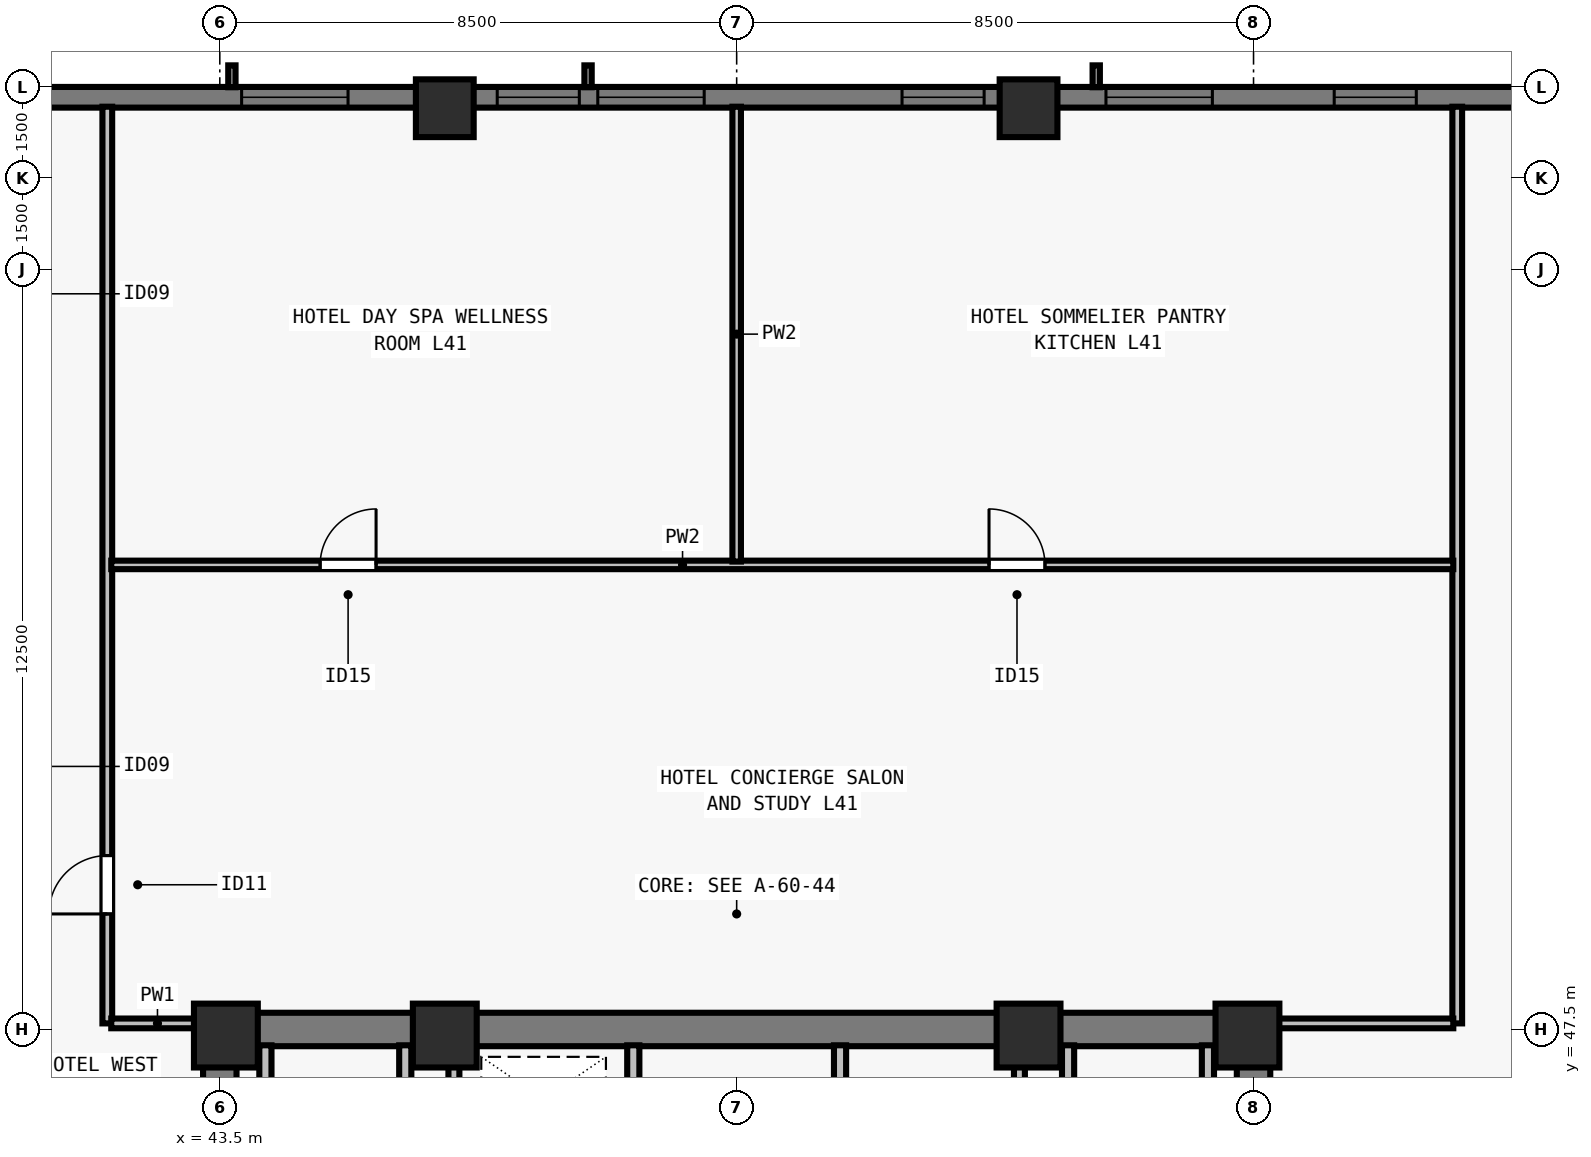
"""IFC4 building model, lengths in metres.
Left out: names, types, materials, properties, quantities, classifications, styles, units other than length and angle.
Written with IfcOpenShell. Run it as: python <this file> out.ifc"""

import sys

from ifc_helpers import new_model, si_unit, direction, frame, frame_2d, origin, origin_2d, place, context, subcontext, project, spatial, rectangle, extrude, element, fill, save


model = new_model("IFC4")
c1 = context("Model", 3, precision=1e-05, world=origin(), true_north=direction((0.0, 1.0)))
c2 = subcontext(c1, "Body", "Model", "MODEL_VIEW")
j1 = project(units=[si_unit("LENGTHUNIT", "METRE"), si_unit("PLANEANGLEUNIT", "RADIAN")], contexts=[c1])
p1 = place(None, origin())
s1 = spatial("IfcSite", under=j1, at=p1, CompositionType="ELEMENT")
p2 = place(p1, origin())
s2 = spatial("IfcBuilding", under=s1, at=p2, CompositionType="ELEMENT")
p3 = place(p2, frame((0.0, 0.0, 151.5)))
s3 = spatial("IfcBuildingStorey", under=s2, at=p3, CompositionType="ELEMENT", Elevation=151.5)
for number, where, z_axis, x_axis in (
    (1, (43.6, 47.4, 0.0), (0.0, 0.0, 1.0), (1.0, 0.0, 0.0)),
    (2, (47.2, 47.4, 0.0), (0.0, 0.0, 1.0), (1.0, 0.0, 0.0)),
    (3, (56.8, 47.4, 0.0), (0.0, 0.0, 1.0), (1.0, 0.0, 0.0)),
    (4, (60.4, 47.4, 0.0), (0.0, 0.0, 1.0), (1.0, 0.0, 0.0)),
):
    element("IfcColumn", number, at=place(p3, frame(where, z_axis=z_axis, x_axis=x_axis)), inside=s3, PredefinedType="COLUMN", context=c2, shape_type="SweptSolid", body=[
        extrude(rectangle(XDim=1.05, YDim=1.05, at=origin_2d()), origin(), (0.0, 0.0, 1.0), 3.5),
    ])
for number, where, z_axis, x_axis in (
    (5, (56.8, 62.65, 0.0), (0.0, 0.0, 1.0), (1.0, 0.0, 0.0)),
    (6, (47.2, 62.65, 0.0), (0.0, 0.0, 1.0), (1.0, 0.0, 0.0)),
):
    element("IfcColumn", number, at=place(p3, frame(where, z_axis=z_axis, x_axis=x_axis)), inside=s3, PredefinedType="COLUMN", context=c2, shape_type="SweptSolid", body=[
        extrude(rectangle(XDim=0.95, YDim=0.95, at=origin_2d()), origin(), (0.0, 0.0, 1.0), 3.5),
    ])
p4 = place(p3, frame((32.0, 62.83, 0.0), z_axis=(0.0, 0.0, 1.0), x_axis=(1.0, 0.0, 0.0)))
e7 = element("IfcWall", 7, at=p4, inside=s3, PredefinedType="SOLIDWALL", context=c2, shape_type="SweptSolid", body=[
    extrude(rectangle(XDim=39.682, YDim=0.34, at=frame_2d((19.841, 0.0))), origin(), (0.0, 0.0, 1.0), 3.28),
])
p5 = place(p4, frame((4.752, 0.0, 0.8)))
e8 = element("IfcOpeningElement", 8, at=p5, cuts=e7, PredefinedType="OPENING", context=c2, shape_type="SweptSolid", body=[
    extrude(rectangle(XDim=1.75, YDim=1.66, at=frame_2d((0.875, 0.83))), frame((0.0, 0.18, 0.0), z_axis=(0.0, -1.0, 0.0), x_axis=(1.0, 0.0, 0.0)), (0.0, 0.0, 1.0), 0.36),
])
p6 = place(p4, frame((11.859, 0.0, 0.8)))
e9 = element("IfcOpeningElement", 9, at=p6, cuts=e7, PredefinedType="OPENING", context=c2, shape_type="SweptSolid", body=[
    extrude(rectangle(XDim=1.75, YDim=1.66, at=frame_2d((0.875, 0.83))), frame((0.0, 0.18, 0.0), z_axis=(0.0, -1.0, 0.0), x_axis=(1.0, 0.0, 0.0)), (0.0, 0.0, 1.0), 0.36),
])
p7 = place(p4, frame((16.062, 0.0, 0.8)))
e10 = element("IfcOpeningElement", 10, at=p7, cuts=e7, PredefinedType="OPENING", context=c2, shape_type="SweptSolid", body=[
    extrude(rectangle(XDim=1.35, YDim=1.66, at=frame_2d((0.675, 0.83))), frame((0.0, 0.18, 0.0), z_axis=(0.0, -1.0, 0.0), x_axis=(1.0, 0.0, 0.0)), (0.0, 0.0, 1.0), 0.36),
])
p8 = place(p4, frame((17.716, 0.0, 0.8)))
e11 = element("IfcOpeningElement", 11, at=p8, cuts=e7, PredefinedType="OPENING", context=c2, shape_type="SweptSolid", body=[
    extrude(rectangle(XDim=1.75, YDim=1.66, at=frame_2d((0.875, 0.83))), frame((0.0, 0.18, 0.0), z_axis=(0.0, -1.0, 0.0), x_axis=(1.0, 0.0, 0.0)), (0.0, 0.0, 1.0), 0.36),
])
p9 = place(p4, frame((22.719, 0.0, 0.8)))
e12 = element("IfcOpeningElement", 12, at=p9, cuts=e7, PredefinedType="OPENING", context=c2, shape_type="SweptSolid", body=[
    extrude(rectangle(XDim=1.35, YDim=1.66, at=frame_2d((0.675, 0.83))), frame((0.0, 0.18, 0.0), z_axis=(0.0, -1.0, 0.0), x_axis=(1.0, 0.0, 0.0)), (0.0, 0.0, 1.0), 0.36),
])
p10 = place(p4, frame((26.073, 0.0, 0.8)))
e13 = element("IfcOpeningElement", 13, at=p10, cuts=e7, PredefinedType="OPENING", context=c2, shape_type="SweptSolid", body=[
    extrude(rectangle(XDim=1.75, YDim=1.66, at=frame_2d((0.875, 0.83))), frame((0.0, 0.18, 0.0), z_axis=(0.0, -1.0, 0.0), x_axis=(1.0, 0.0, 0.0)), (0.0, 0.0, 1.0), 0.36),
])
p11 = place(p4, frame((29.827, 0.0, 0.8)))
e14 = element("IfcOpeningElement", 14, at=p11, cuts=e7, PredefinedType="OPENING", context=c2, shape_type="SweptSolid", body=[
    extrude(rectangle(XDim=1.35, YDim=1.66, at=frame_2d((0.675, 0.83))), frame((0.0, 0.18, 0.0), z_axis=(0.0, -1.0, 0.0), x_axis=(1.0, 0.0, 0.0)), (0.0, 0.0, 1.0), 0.36),
])
p12 = place(p3, frame((43.225, 47.5, 0.0), z_axis=(0.0, 0.0, 1.0), x_axis=(1.0, 0.0, 0.0)))
e15 = element("IfcWall", 15, at=p12, inside=s3, PredefinedType="SHEAR", context=c2, shape_type="SweptSolid", body=[
    extrude(rectangle(XDim=17.55, YDim=0.55, at=frame_2d((8.775, 0.0))), origin(), (0.0, 0.0, 1.0), 3.28),
])
for number, where, z_axis, x_axis in (
    (16, (43.5, 40.8, 0.0), (0.0, 0.0, 1.0), (0.0, 1.0, 0.0)),
    (17, (60.5, 40.8, 0.0), (0.0, 0.0, 1.0), (0.0, 1.0, 0.0)),
):
    element("IfcWall", number, at=place(p3, frame(where, z_axis=z_axis, x_axis=x_axis)), inside=s3, PredefinedType="SHEAR", context=c2, shape_type="SweptSolid", body=[
        extrude(rectangle(XDim=6.435, YDim=0.55, at=frame_2d((3.218, 0.0))), origin(), (0.0, 0.0, 1.0), 3.28),
    ])
p13 = place(p3, frame((50.3, 40.585, 0.0), z_axis=(0.0, 0.0, 1.0), x_axis=(0.0, 1.0, 0.0)))
e18 = element("IfcWall", 18, at=p13, inside=s3, PredefinedType="SOLIDWALL", context=c2, shape_type="SweptSolid", body=[
    extrude(rectangle(XDim=6.655, YDim=0.2, at=frame_2d((3.328, 0.0))), origin(), (0.0, 0.0, 1.0), 3.28),
])
p14 = place(p13, frame((5.065, 0.0, 0.0)))
e19 = element("IfcOpeningElement", 19, at=p14, cuts=e18, PredefinedType="OPENING", context=c2, shape_type="SweptSolid", body=[
    extrude(rectangle(XDim=0.8, YDim=2.08, at=frame_2d((0.4, 1.04))), frame((0.0, 0.11, 0.0), z_axis=(0.0, -1.0, 0.0), x_axis=(1.0, 0.0, 0.0)), (0.0, 0.0, 1.0), 0.22),
])
p15 = place(p3, frame((53.7, 40.585, 0.0), z_axis=(0.0, 0.0, 1.0), x_axis=(0.0, 1.0, 0.0)))
e20 = element("IfcWall", 20, at=p15, inside=s3, PredefinedType="SOLIDWALL", context=c2, shape_type="SweptSolid", body=[
    extrude(rectangle(XDim=6.655, YDim=0.2, at=frame_2d((3.328, 0.0))), origin(), (0.0, 0.0, 1.0), 3.28),
])
p16 = place(p15, frame((0.195, 0.0, 0.0)))
e21 = element("IfcOpeningElement", 21, at=p16, cuts=e20, PredefinedType="OPENING", context=c2, shape_type="SweptSolid", body=[
    extrude(rectangle(XDim=0.8, YDim=2.08, at=frame_2d((0.4, 1.04))), frame((0.0, 0.11, 0.0), z_axis=(0.0, -1.0, 0.0), x_axis=(1.0, 0.0, 0.0)), (0.0, 0.0, 1.0), 0.22),
])
p17 = place(p15, frame((4.265, 0.0, 0.0)))
e22 = element("IfcOpeningElement", 22, at=p17, cuts=e20, PredefinedType="OPENING", context=c2, shape_type="SweptSolid", body=[
    extrude(rectangle(XDim=0.95, YDim=2.12, at=frame_2d((0.475, 1.06))), frame((0.0, 0.11, 0.0), z_axis=(0.0, -1.0, 0.0), x_axis=(1.0, 0.0, 0.0)), (0.0, 0.0, 1.0), 0.22),
])
for number, where, z_axis, x_axis in (
    (23, (46.55, 43.735, 0.0), (0.0, 0.0, 1.0), (0.0, 1.0, 0.0)),
    (24, (44.25, 43.735, 0.0), (0.0, 0.0, 1.0), (0.0, 1.0, 0.0)),
    (25, (57.45, 43.735, 0.0), (0.0, 0.0, 1.0), (0.0, 1.0, 0.0)),
    (26, (59.75, 43.735, 0.0), (0.0, 0.0, 1.0), (0.0, 1.0, 0.0)),
):
    element("IfcWall", number, at=place(p3, frame(where, z_axis=z_axis, x_axis=x_axis)), inside=s3, PredefinedType="SOLIDWALL", context=c2, shape_type="SweptSolid", body=[
        extrude(rectangle(XDim=3.505, YDim=0.2, at=frame_2d((1.752, 0.0))), origin(), (0.0, 0.0, 1.0), 3.28),
    ])
for number, where, z_axis, x_axis in (
    (27, (47.35, 43.735, 0.0), (0.0, 0.0, 1.0), (0.0, 1.0, 0.0)),
    (28, (56.65, 43.735, 0.0), (0.0, 0.0, 1.0), (0.0, 1.0, 0.0)),
):
    element("IfcWall", number, at=place(p3, frame(where, z_axis=z_axis, x_axis=x_axis)), inside=s3, PredefinedType="SOLIDWALL", context=c2, shape_type="SweptSolid", body=[
        extrude(rectangle(XDim=3.505, YDim=0.18, at=frame_2d((1.752, 0.0))), origin(), (0.0, 0.0, 1.0), 3.28),
    ])
p18 = place(p3, frame((41.65, 47.6, 0.0), z_axis=(0.0, 0.0, 1.0), x_axis=(0.0, 1.0, 0.0)))
e29 = element("IfcWall", 29, at=p18, inside=s3, PredefinedType="PARTITIONING", context=c2, shape_type="SweptSolid", body=[
    extrude(rectangle(XDim=15.075, YDim=0.16, at=frame_2d((7.538, 0.0))), origin(), (0.0, 0.0, 1.0), 2.555),
])
p19 = place(p18, frame((1.8, 0.0, 0.0)))
e30 = element("IfcOpeningElement", 30, at=p19, cuts=e29, PredefinedType="OPENING", context=c2, shape_type="SweptSolid", body=[
    extrude(rectangle(XDim=0.96, YDim=2.12, at=frame_2d((0.48, 1.06))), frame((0.0, 0.09, 0.0), z_axis=(0.0, -1.0, 0.0), x_axis=(1.0, 0.0, 0.0)), (0.0, 0.0, 1.0), 0.18),
])
p20 = place(p3, frame((41.715, 47.6, 0.0), z_axis=(0.0, 0.0, 1.0), x_axis=(1.0, 0.0, 0.0)))
e31 = element("IfcWall", 31, at=p20, inside=s3, PredefinedType="PARTITIONING", context=c2, shape_type="SweptSolid", body=[
    extrude(rectangle(XDim=1.52, YDim=0.16, at=frame_2d((0.76, 0.0))), origin(), (0.0, 0.0, 1.0), 3.28),
])
p21 = place(p3, frame((63.85, 47.6, 0.0), z_axis=(0.0, 0.0, 1.0), x_axis=(0.0, 1.0, 0.0)))
e32 = element("IfcWall", 32, at=p21, inside=s3, PredefinedType="PARTITIONING", context=c2, shape_type="SweptSolid", body=[
    extrude(rectangle(XDim=15.075, YDim=0.16, at=frame_2d((7.538, 0.0))), origin(), (0.0, 0.0, 1.0), 2.555),
])
p22 = place(p3, frame((60.765, 47.6, 0.0), z_axis=(0.0, 0.0, 1.0), x_axis=(1.0, 0.0, 0.0)))
e33 = element("IfcWall", 33, at=p22, inside=s3, PredefinedType="PARTITIONING", context=c2, shape_type="SweptSolid", body=[
    extrude(rectangle(XDim=3.02, YDim=0.16, at=frame_2d((1.51, 0.0))), origin(), (0.0, 0.0, 1.0), 3.28),
])
p23 = place(p3, frame((41.715, 55.14, 0.0), z_axis=(0.0, 0.0, 1.0), x_axis=(1.0, 0.0, 0.0)))
e34 = element("IfcWall", 34, at=p23, inside=s3, PredefinedType="PARTITIONING", context=c2, shape_type="SweptSolid", body=[
    extrude(rectangle(XDim=22.07, YDim=0.14, at=frame_2d((11.035, 0.0))), origin(), (0.0, 0.0, 1.0), 3.28),
])
p24 = place(p23, frame((3.435, 0.0, 0.0)))
e35 = element("IfcOpeningElement", 35, at=p24, cuts=e34, PredefinedType="OPENING", context=c2, shape_type="SweptSolid", body=[
    extrude(rectangle(XDim=0.92, YDim=2.12, at=frame_2d((0.46, 1.06))), frame((0.0, 0.08, 0.0), z_axis=(0.0, -1.0, 0.0), x_axis=(1.0, 0.0, 0.0)), (0.0, 0.0, 1.0), 0.16),
])
p25 = place(p23, frame((14.435, 0.0, 0.0)))
e36 = element("IfcOpeningElement", 36, at=p25, cuts=e34, PredefinedType="OPENING", context=c2, shape_type="SweptSolid", body=[
    extrude(rectangle(XDim=0.92, YDim=2.12, at=frame_2d((0.46, 1.06))), frame((0.0, 0.08, 0.0), z_axis=(0.0, -1.0, 0.0), x_axis=(1.0, 0.0, 0.0)), (0.0, 0.0, 1.0), 0.16),
])
p26 = place(p3, frame((52.0, 55.195, 0.0), z_axis=(0.0, 0.0, 1.0), x_axis=(0.0, 1.0, 0.0)))
e37 = element("IfcWall", 37, at=p26, inside=s3, PredefinedType="PARTITIONING", context=c2, shape_type="SweptSolid", body=[
    extrude(rectangle(XDim=7.48, YDim=0.14, at=frame_2d((3.74, 0.0))), origin(), (0.0, 0.0, 1.0), 3.28),
])
p27 = place(p6, origin())
e38 = element("IfcWindow", 38, at=p27, inside=s3, PartitioningType="SINGLE_PANEL", PredefinedType="WINDOW", context=c2, shape_type="SweptSolid", body=[
    extrude(rectangle(XDim=1.75, YDim=1.66, at=frame_2d((0.875, 0.83))), frame((0.0, -0.05, 0.0), z_axis=(0.0, -1.0, 0.0), x_axis=(1.0, 0.0, 0.0)), (0.0, 0.0, 1.0), 0.06),
])
fill(e9, e38)
p28 = place(p7, origin())
e39 = element("IfcWindow", 39, at=p28, inside=s3, PartitioningType="SINGLE_PANEL", PredefinedType="WINDOW", context=c2, shape_type="SweptSolid", body=[
    extrude(rectangle(XDim=1.35, YDim=1.66, at=frame_2d((0.675, 0.83))), frame((0.0, -0.05, 0.0), z_axis=(0.0, -1.0, 0.0), x_axis=(1.0, 0.0, 0.0)), (0.0, 0.0, 1.0), 0.06),
])
fill(e10, e39)
p29 = place(p8, origin())
e40 = element("IfcWindow", 40, at=p29, inside=s3, PartitioningType="SINGLE_PANEL", PredefinedType="WINDOW", context=c2, shape_type="SweptSolid", body=[
    extrude(rectangle(XDim=1.75, YDim=1.66, at=frame_2d((0.875, 0.83))), frame((0.0, -0.05, 0.0), z_axis=(0.0, -1.0, 0.0), x_axis=(1.0, 0.0, 0.0)), (0.0, 0.0, 1.0), 0.06),
])
fill(e11, e40)
p30 = place(p9, origin())
e41 = element("IfcWindow", 41, at=p30, inside=s3, PartitioningType="SINGLE_PANEL", PredefinedType="WINDOW", context=c2, shape_type="SweptSolid", body=[
    extrude(rectangle(XDim=1.35, YDim=1.66, at=frame_2d((0.675, 0.83))), frame((0.0, -0.05, 0.0), z_axis=(0.0, -1.0, 0.0), x_axis=(1.0, 0.0, 0.0)), (0.0, 0.0, 1.0), 0.06),
])
fill(e12, e41)
p31 = place(p10, origin())
e42 = element("IfcWindow", 42, at=p31, inside=s3, PartitioningType="SINGLE_PANEL", PredefinedType="WINDOW", context=c2, shape_type="SweptSolid", body=[
    extrude(rectangle(XDim=1.75, YDim=1.66, at=frame_2d((0.875, 0.83))), frame((0.0, -0.05, 0.0), z_axis=(0.0, -1.0, 0.0), x_axis=(1.0, 0.0, 0.0)), (0.0, 0.0, 1.0), 0.06),
])
fill(e13, e42)
p32 = place(p11, origin())
e43 = element("IfcWindow", 43, at=p32, inside=s3, PartitioningType="SINGLE_PANEL", PredefinedType="WINDOW", context=c2, shape_type="SweptSolid", body=[
    extrude(rectangle(XDim=1.35, YDim=1.66, at=frame_2d((0.675, 0.83))), frame((0.0, -0.05, 0.0), z_axis=(0.0, -1.0, 0.0), x_axis=(1.0, 0.0, 0.0)), (0.0, 0.0, 1.0), 0.06),
])
fill(e14, e43)
p33 = place(p19, origin())
e44 = element("IfcDoor", 44, at=p33, inside=s3, OperationType="SINGLE_SWING_LEFT", PredefinedType="DOOR", context=c2, shape_type="SweptSolid", body=[
    extrude(rectangle(XDim=0.96, YDim=2.12, at=frame_2d((0.48, 1.06))), frame((0.0, 0.025, 0.0), z_axis=(0.0, -1.0, 0.0), x_axis=(1.0, 0.0, 0.0)), (0.0, 0.0, 1.0), 0.05),
])
fill(e30, e44)
p34 = place(p24, origin())
e45 = element("IfcDoor", 45, at=p34, inside=s3, OperationType="SINGLE_SWING_RIGHT", PredefinedType="DOOR", context=c2, shape_type="SweptSolid", body=[
    extrude(rectangle(XDim=0.92, YDim=2.12, at=frame_2d((0.46, 1.06))), frame((0.0, 0.025, 0.0), z_axis=(0.0, -1.0, 0.0), x_axis=(1.0, 0.0, 0.0)), (0.0, 0.0, 1.0), 0.05),
])
fill(e35, e45)
p35 = place(p25, origin())
e46 = element("IfcDoor", 46, at=p35, inside=s3, OperationType="SINGLE_SWING_LEFT", PredefinedType="DOOR", context=c2, shape_type="SweptSolid", body=[
    extrude(rectangle(XDim=0.92, YDim=2.12, at=frame_2d((0.46, 1.06))), frame((0.0, 0.025, 0.0), z_axis=(0.0, -1.0, 0.0), x_axis=(1.0, 0.0, 0.0)), (0.0, 0.0, 1.0), 0.05),
])
fill(e36, e46)
save(model, sys.argv[1])
